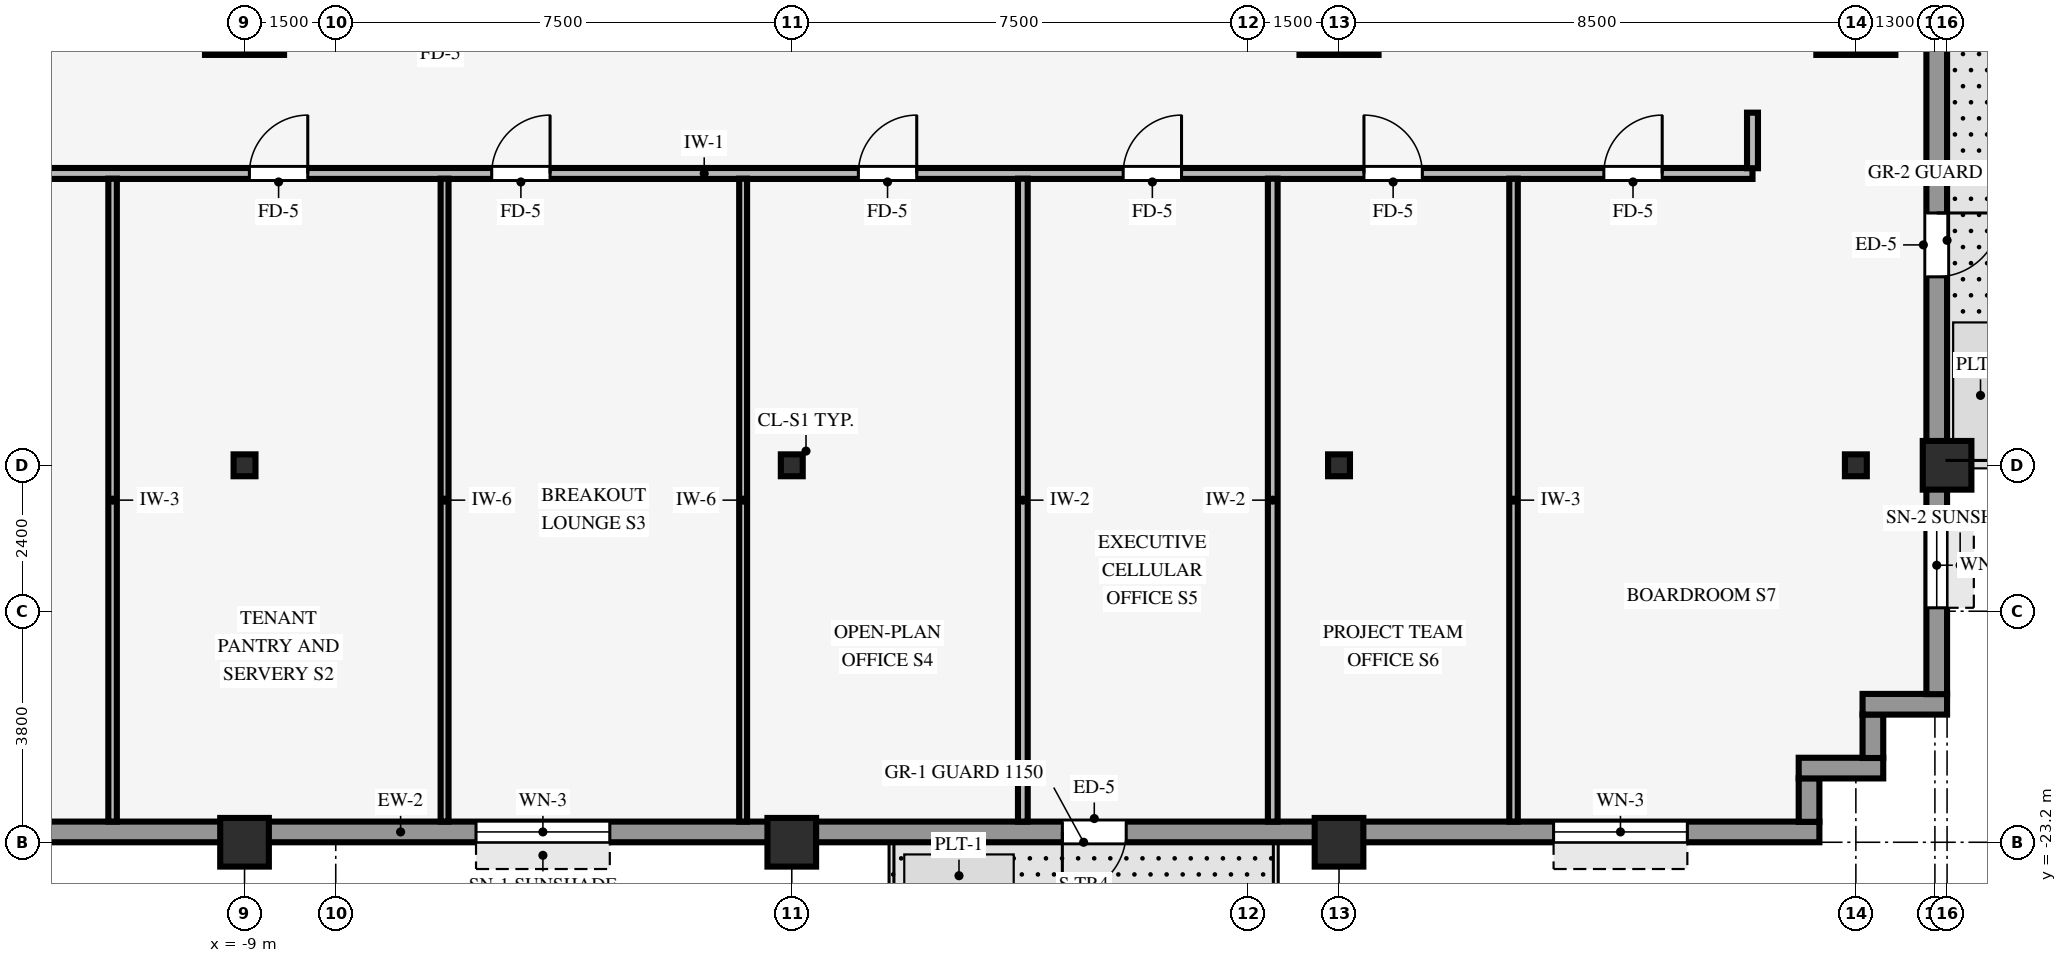
"""IFC4 building model, lengths in metres.
Left out: names, types, materials, properties, quantities, classifications, styles, units other than length and angle.
Written with IfcOpenShell. Run it as: python <this file> out.ifc"""

import sys

from ifc_helpers import new_model, si_unit, direction, frame, frame_2d, origin, origin_2d, place, context, subcontext, project, spatial, rectangle, hollow_rectangle, i_section, extrude, source, transform, mapped, element, fill, save


model = new_model("IFC4")
c1 = context("Model", 3, precision=1e-05, world=origin(), true_north=direction((0.0, 1.0)))
c2 = subcontext(c1, "Body", "Model", "MODEL_VIEW")
j1 = project(units=[si_unit("LENGTHUNIT", "METRE"), si_unit("PLANEANGLEUNIT", "RADIAN")], contexts=[c1])
p1 = place(None, origin())
s1 = spatial("IfcSite", under=j1, at=p1, CompositionType="ELEMENT")
p2 = place(p1, origin())
s2 = spatial("IfcBuilding", under=s1, at=p2, CompositionType="ELEMENT")
p3 = place(p2, frame((0.0, 0.0, 27.6)))
s3 = spatial("IfcBuildingStorey", under=s2, at=p3, CompositionType="ELEMENT", Elevation=27.6)
for number, where, z_axis, x_axis in (
    (1, (-9.0, -9.6, 0.0), (0.0, 0.0, 1.0), (1.0, 0.0, 0.0)),
    (2, (9.0, -9.6, 0.0), (0.0, 0.0, 1.0), (1.0, 0.0, 0.0)),
    (3, (17.5, -9.6, 0.0), (0.0, 0.0, 1.0), (1.0, 0.0, 0.0)),
):
    element("IfcColumn", number, at=place(p3, frame(where, z_axis=z_axis, x_axis=x_axis)), inside=s3, PredefinedType="COLUMN", context=c2, shape_type="SweptSolid", body=[
        extrude(rectangle(XDim=1.3, YDim=1.3, at=origin_2d()), origin(), (0.0, 0.0, 1.0), 3.37),
    ])
p4 = place(p3, frame((19.0, -17.0, 0.0), z_axis=(0.0, 0.0, 1.0), x_axis=(1.0, 0.0, 0.0)))
e4 = element("IfcColumn", 4, at=p4, inside=s3, PredefinedType="COLUMN", context=c2, shape_type="SweptSolid", body=[
    extrude(hollow_rectangle(XDim=0.8, YDim=0.8, WallThickness=0.055, InnerFilletRadius=0.055, OuterFilletRadius=0.11, at=origin_2d()), origin(), (0.0, 0.0, 1.0), 3.37),
])
for number, where, z_axis, x_axis in (
    (5, (-9.0, -23.2, -0.4), (0.0, 0.0, 1.0), (1.0, 0.0, 0.0)),
    (6, (0.0, -23.2, -0.4), (0.0, 0.0, 1.0), (1.0, 0.0, 0.0)),
    (7, (9.0, -23.2, -0.4), (0.0, 0.0, 1.0), (1.0, 0.0, 0.0)),
):
    element("IfcColumn", number, at=place(p3, frame(where, z_axis=z_axis, x_axis=x_axis)), inside=s3, PredefinedType="COLUMN", context=c2, shape_type="SweptSolid", body=[
        extrude(hollow_rectangle(XDim=0.8, YDim=0.8, WallThickness=0.055, InnerFilletRadius=0.055, OuterFilletRadius=0.11, at=origin_2d()), origin(), (0.0, 0.0, 1.0), 3.77),
    ])
p5 = place(p3, frame((0.0, -17.0, 0.0), z_axis=(0.0, 0.0, 1.0), x_axis=(1.0, 0.0, 0.0)))
e8 = element("IfcColumn", 8, at=p5, inside=s3, PredefinedType="COLUMN", context=c2, shape_type="SweptSolid", body=[
    extrude(i_section(OverallWidth=0.36, OverallDepth=0.36, WebThickness=0.021, FlangeThickness=0.021, FilletRadius=0.018, at=origin_2d()), origin(), (0.0, 0.0, 1.0), 3.37),
])
for number, where, z_axis, x_axis in (
    (9, (-9.0, -17.0, -0.4), (0.0, 0.0, 1.0), (1.0, 0.0, 0.0)),
    (10, (9.0, -17.0, -0.4), (0.0, 0.0, 1.0), (1.0, 0.0, 0.0)),
    (11, (17.5, -17.0, -0.4), (0.0, 0.0, 1.0), (1.0, 0.0, 0.0)),
):
    element("IfcColumn", number, at=place(p3, frame(where, z_axis=z_axis, x_axis=x_axis)), inside=s3, PredefinedType="COLUMN", context=c2, shape_type="SweptSolid", body=[
        extrude(i_section(OverallWidth=0.36, OverallDepth=0.36, WebThickness=0.021, FlangeThickness=0.021, FilletRadius=0.018, at=origin_2d()), origin(), (0.0, 0.0, 1.0), 3.77),
    ])
p6 = place(p3, frame((-16.9, -23.03, 0.0), z_axis=(0.0, 0.0, 1.0), x_axis=(1.0, 0.0, 0.0)))
e12 = element("IfcWall", 12, at=p6, inside=s3, PredefinedType="STANDARD", context=c2, shape_type="SweptSolid", body=[
    extrude(rectangle(XDim=33.8, YDim=0.34, at=frame_2d((16.9, 0.0))), origin(), (0.0, 0.0, 1.0), 2.705),
])
p7 = place(p6, frame((22.4, 0.0, 0.0), z_axis=(0.0, 0.0, 1.0), x_axis=(-1.0, 0.0, 0.0)))
e13 = element("IfcOpeningElement", 13, at=p7, cuts=e12, PredefinedType="OPENING", context=c2, shape_type="SweptSolid", body=[
    extrude(rectangle(XDim=1.05, YDim=2.1, at=frame_2d((0.525, 1.05))), frame((0.0, 0.18, 0.0), z_axis=(0.0, -1.0, 0.0), x_axis=(1.0, 0.0, 0.0)), (0.0, 0.0, 1.0), 0.36),
])
p8 = place(p6, frame((2.171, 0.0, 0.8)))
e14 = element("IfcOpeningElement", 14, at=p8, cuts=e12, PredefinedType="OPENING", context=c2, shape_type="SweptSolid", body=[
    extrude(rectangle(XDim=2.2, YDim=1.65, at=frame_2d((1.1, 0.825))), frame((0.0, 0.18, 0.0), z_axis=(0.0, -1.0, 0.0), x_axis=(1.0, 0.0, 0.0)), (0.0, 0.0, 1.0), 0.36),
])
p9 = place(p6, frame((11.707, 0.0, 0.8)))
e15 = element("IfcOpeningElement", 15, at=p9, cuts=e12, PredefinedType="OPENING", context=c2, shape_type="SweptSolid", body=[
    extrude(rectangle(XDim=2.2, YDim=1.65, at=frame_2d((1.1, 0.825))), frame((0.0, 0.18, 0.0), z_axis=(0.0, -1.0, 0.0), x_axis=(1.0, 0.0, 0.0)), (0.0, 0.0, 1.0), 0.36),
])
p10 = place(p6, frame((29.429, 0.0, 0.8)))
e16 = element("IfcOpeningElement", 16, at=p10, cuts=e12, PredefinedType="OPENING", context=c2, shape_type="SweptSolid", body=[
    extrude(rectangle(XDim=2.2, YDim=1.65, at=frame_2d((1.1, 0.825))), frame((0.0, 0.18, 0.0), z_axis=(0.0, -1.0, 0.0), x_axis=(1.0, 0.0, 0.0)), (0.0, 0.0, 1.0), 0.36),
])
p11 = place(p3, frame((16.73, -22.864, 0.0), z_axis=(0.0, 0.0, 1.0), x_axis=(0.0, 1.0, 0.0)))
e17 = element("IfcWall", 17, at=p11, inside=s3, PredefinedType="STANDARD", context=c2, shape_type="SweptSolid", body=[
    extrude(rectangle(XDim=0.718, YDim=0.34, at=frame_2d((0.359, 0.0))), origin(), (0.0, 0.0, 1.0), 3.36),
])
p12 = place(p3, frame((16.56, -21.98, 0.0), z_axis=(0.0, 0.0, 1.0), x_axis=(1.0, 0.0, 0.0)))
e18 = element("IfcWall", 18, at=p12, inside=s3, PredefinedType="STANDARD", context=c2, shape_type="SweptSolid", body=[
    extrude(rectangle(XDim=1.39, YDim=0.34, at=frame_2d((0.695, 0.0))), origin(), (0.0, 0.0, 1.0), 3.36),
])
p13 = place(p3, frame((17.78, -21.814, 0.0), z_axis=(0.0, 0.0, 1.0), x_axis=(0.0, 1.0, 0.0)))
e19 = element("IfcWall", 19, at=p13, inside=s3, PredefinedType="STANDARD", context=c2, shape_type="SweptSolid", body=[
    extrude(rectangle(XDim=0.718, YDim=0.34, at=frame_2d((0.359, 0.0))), origin(), (0.0, 0.0, 1.0), 3.36),
])
p14 = place(p3, frame((17.61, -20.93, 0.0), z_axis=(0.0, 0.0, 1.0), x_axis=(1.0, 0.0, 0.0)))
e20 = element("IfcWall", 20, at=p14, inside=s3, PredefinedType="STANDARD", context=c2, shape_type="SweptSolid", body=[
    extrude(rectangle(XDim=1.39, YDim=0.34, at=frame_2d((0.695, 0.0))), origin(), (0.0, 0.0, 1.0), 3.36),
])
p15 = place(p3, frame((18.83, -20.764, 0.0), z_axis=(0.0, 0.0, 1.0), x_axis=(0.0, 1.0, 0.0)))
e21 = element("IfcWall", 21, at=p15, inside=s3, PredefinedType="STANDARD", context=c2, shape_type="SweptSolid", body=[
    extrude(rectangle(XDim=41.528, YDim=0.34, at=frame_2d((20.764, 0.0))), origin(), (0.0, 0.0, 1.0), 2.705),
])
p16 = place(p15, frame((7.914, 0.0, 0.0), z_axis=(0.0, 0.0, 1.0), x_axis=(-1.0, 0.0, 0.0)))
e22 = element("IfcOpeningElement", 22, at=p16, cuts=e21, PredefinedType="OPENING", context=c2, shape_type="SweptSolid", body=[
    extrude(rectangle(XDim=1.05, YDim=2.1, at=frame_2d((0.525, 1.05))), frame((0.0, 0.18, 0.0), z_axis=(0.0, -1.0, 0.0), x_axis=(1.0, 0.0, 0.0)), (0.0, 0.0, 1.0), 0.36),
])
p17 = place(p15, frame((1.42, 0.0, 0.8)))
e23 = element("IfcOpeningElement", 23, at=p17, cuts=e21, PredefinedType="OPENING", context=c2, shape_type="SweptSolid", body=[
    extrude(rectangle(XDim=1.4, YDim=1.65, at=frame_2d((0.7, 0.825))), frame((0.0, 0.18, 0.0), z_axis=(0.0, -1.0, 0.0), x_axis=(1.0, 0.0, 0.0)), (0.0, 0.0, 1.0), 0.36),
])
p18 = place(p15, frame((32.417, 0.0, 0.8)))
e24 = element("IfcOpeningElement", 24, at=p18, cuts=e21, PredefinedType="OPENING", context=c2, shape_type="SweptSolid", body=[
    extrude(rectangle(XDim=1.4, YDim=1.65, at=frame_2d((0.7, 0.825))), frame((0.0, 0.18, 0.0), z_axis=(0.0, -1.0, 0.0), x_axis=(1.0, 0.0, 0.0)), (0.0, 0.0, 1.0), 0.36),
])
p19 = place(p15, frame((38.708, 0.0, 0.8)))
e25 = element("IfcOpeningElement", 25, at=p19, cuts=e21, PredefinedType="OPENING", context=c2, shape_type="SweptSolid", body=[
    extrude(rectangle(XDim=1.4, YDim=1.65, at=frame_2d((0.7, 0.825))), frame((0.0, 0.18, 0.0), z_axis=(0.0, -1.0, 0.0), x_axis=(1.0, 0.0, 0.0)), (0.0, 0.0, 1.0), 0.36),
])
p20 = place(p3, frame((-15.8, -12.2, 0.0), z_axis=(0.0, 0.0, 1.0), x_axis=(1.0, 0.0, 0.0)))
e26 = element("IfcWall", 26, at=p20, inside=s3, PredefinedType="PARTITIONING", context=c2, shape_type="SweptSolid", body=[
    extrude(rectangle(XDim=31.6, YDim=0.18, at=frame_2d((15.8, 0.0))), origin(), (0.0, 0.0, 1.0), 3.36),
])
p21 = place(p20, frame((6.88, 0.0, 0.0)))
e27 = element("IfcOpeningElement", 27, at=p21, cuts=e26, PredefinedType="OPENING", context=c2, shape_type="SweptSolid", body=[
    extrude(rectangle(XDim=0.96, YDim=2.1, at=frame_2d((0.48, 1.05))), frame((0.0, 0.1, 0.0), z_axis=(0.0, -1.0, 0.0), x_axis=(1.0, 0.0, 0.0)), (0.0, 0.0, 1.0), 0.2),
])
p22 = place(p20, frame((16.895, 0.0, 0.0)))
e28 = element("IfcOpeningElement", 28, at=p22, cuts=e26, PredefinedType="OPENING", context=c2, shape_type="SweptSolid", body=[
    extrude(rectangle(XDim=0.96, YDim=2.1, at=frame_2d((0.48, 1.05))), frame((0.0, 0.1, 0.0), z_axis=(0.0, -1.0, 0.0), x_axis=(1.0, 0.0, 0.0)), (0.0, 0.0, 1.0), 0.2),
])
p23 = place(p20, frame((1.835, 0.0, 0.0)))
e29 = element("IfcOpeningElement", 29, at=p23, cuts=e26, PredefinedType="OPENING", context=c2, shape_type="SweptSolid", body=[
    extrude(rectangle(XDim=0.96, YDim=2.1, at=frame_2d((0.48, 1.05))), frame((0.0, 0.1, 0.0), z_axis=(0.0, -1.0, 0.0), x_axis=(1.0, 0.0, 0.0)), (0.0, 0.0, 1.0), 0.2),
])
p24 = place(p20, frame((21.25, 0.0, 0.0)))
e30 = element("IfcOpeningElement", 30, at=p24, cuts=e26, PredefinedType="OPENING", context=c2, shape_type="SweptSolid", body=[
    extrude(rectangle(XDim=0.96, YDim=2.1, at=frame_2d((0.48, 1.05))), frame((0.0, 0.1, 0.0), z_axis=(0.0, -1.0, 0.0), x_axis=(1.0, 0.0, 0.0)), (0.0, 0.0, 1.0), 0.2),
])
p25 = place(p20, frame((25.21, 0.0, 0.0)))
e31 = element("IfcOpeningElement", 31, at=p25, cuts=e26, PredefinedType="OPENING", context=c2, shape_type="SweptSolid", body=[
    extrude(rectangle(XDim=0.96, YDim=2.1, at=frame_2d((0.48, 1.05))), frame((0.0, 0.1, 0.0), z_axis=(0.0, -1.0, 0.0), x_axis=(1.0, 0.0, 0.0)), (0.0, 0.0, 1.0), 0.2),
])
p26 = place(p20, frame((29.155, 0.0, 0.0)))
e32 = element("IfcOpeningElement", 32, at=p26, cuts=e26, PredefinedType="OPENING", context=c2, shape_type="SweptSolid", body=[
    extrude(rectangle(XDim=0.96, YDim=2.1, at=frame_2d((0.48, 1.05))), frame((0.0, 0.1, 0.0), z_axis=(0.0, -1.0, 0.0), x_axis=(1.0, 0.0, 0.0)), (0.0, 0.0, 1.0), 0.2),
])
p27 = place(p20, frame((10.865, 0.0, 0.0)))
e33 = element("IfcOpeningElement", 33, at=p27, cuts=e26, PredefinedType="OPENING", context=c2, shape_type="SweptSolid", body=[
    extrude(rectangle(XDim=0.96, YDim=2.1, at=frame_2d((0.48, 1.05))), frame((0.0, 0.1, 0.0), z_axis=(0.0, -1.0, 0.0), x_axis=(1.0, 0.0, 0.0)), (0.0, 0.0, 1.0), 0.2),
])
p28 = place(p3, frame((-11.17, -22.86, 0.0), z_axis=(0.0, 0.0, 1.0), x_axis=(0.0, 1.0, 0.0)))
e34 = element("IfcWall", 34, at=p28, inside=s3, PredefinedType="PARTITIONING", context=c2, shape_type="SweptSolid", body=[
    extrude(rectangle(XDim=10.574, YDim=0.14, at=frame_2d((5.287, 0.0))), origin(), (0.0, 0.0, 1.0), 3.36),
])
for number, where, z_axis, x_axis in (
    (35, (-5.71, -22.86, 0.0), (0.0, 0.0, 1.0), (0.0, 1.0, 0.0)),
    (36, (-0.8, -22.86, 0.0), (0.0, 0.0, 1.0), (0.0, 1.0, 0.0)),
):
    element("IfcWall", number, at=place(p3, frame(where, z_axis=z_axis, x_axis=x_axis)), inside=s3, PredefinedType="PARTITIONING", context=c2, shape_type="SweptSolid", body=[
        extrude(rectangle(XDim=10.574, YDim=0.13, at=frame_2d((5.287, 0.0))), origin(), (0.0, 0.0, 1.0), 3.36),
    ])
for number, where, z_axis, x_axis in (
    (37, (3.8, -22.86, 0.0), (0.0, 0.0, 1.0), (0.0, 1.0, 0.0)),
    (38, (7.91, -22.86, 0.0), (0.0, 0.0, 1.0), (0.0, 1.0, 0.0)),
):
    element("IfcWall", number, at=place(p3, frame(where, z_axis=z_axis, x_axis=x_axis)), inside=s3, PredefinedType="PARTITIONING", context=c2, shape_type="SweptSolid", body=[
        extrude(rectangle(XDim=10.574, YDim=0.16, at=frame_2d((5.287, 0.0))), origin(), (0.0, 0.0, 1.0), 3.36),
    ])
p29 = place(p3, frame((11.87, -22.86, 0.0), z_axis=(0.0, 0.0, 1.0), x_axis=(0.0, 1.0, 0.0)))
e39 = element("IfcWall", 39, at=p29, inside=s3, PredefinedType="PARTITIONING", context=c2, shape_type="SweptSolid", body=[
    extrude(rectangle(XDim=10.574, YDim=0.14, at=frame_2d((5.287, 0.0))), origin(), (0.0, 0.0, 1.0), 3.36),
])
p30 = place(p3, frame((15.8, -12.114, 0.0), z_axis=(0.0, 0.0, 1.0), x_axis=(0.0, 1.0, 0.0)))
e40 = element("IfcWall", 40, at=p30, inside=s3, PredefinedType="PARTITIONING", context=c2, shape_type="SweptSolid", body=[
    extrude(rectangle(XDim=0.914, YDim=0.18, at=frame_2d((0.457, 0.0))), origin(), (0.0, 0.0, 1.0), 3.36),
])
m1 = source(origin(), c2, "Body", "SweptSolid", [
    extrude(rectangle(XDim=1.05, YDim=2.1, at=frame_2d((0.525, 1.05))), frame((0.0, 0.025, 0.0), z_axis=(0.0, -1.0, 0.0), x_axis=(1.0, 0.0, 0.0)), (0.0, 0.0, 1.0), 0.05),
])
p31 = place(p7, origin())
e41 = element("IfcDoor", 41, at=p31, inside=s3, OperationType="SINGLE_SWING_RIGHT", PredefinedType="DOOR", context=c2, shape_type="MappedRepresentation", body=[
    mapped(m1, transform((0.0, 0.0, 0.0), scale=1.0)),
])
fill(e13, e41)
m2 = source(origin(), c2, "Body", "SweptSolid", [
    extrude(rectangle(XDim=2.2, YDim=1.65, at=frame_2d((1.1, 0.825))), frame((0.0, 0.03, 0.0), z_axis=(0.0, -1.0, 0.0), x_axis=(1.0, 0.0, 0.0)), (0.0, 0.0, 1.0), 0.06),
])
p32 = place(p9, origin())
e42 = element("IfcWindow", 42, at=p32, inside=s3, PartitioningType="SINGLE_PANEL", PredefinedType="WINDOW", context=c2, shape_type="MappedRepresentation", body=[
    mapped(m2, transform((0.0, 0.0, 0.0), scale=1.0)),
])
fill(e15, e42)
p33 = place(p10, origin())
e43 = element("IfcWindow", 43, at=p33, inside=s3, PartitioningType="SINGLE_PANEL", PredefinedType="WINDOW", context=c2, shape_type="MappedRepresentation", body=[
    mapped(m2, transform((0.0, 0.0, 0.0), scale=1.0)),
])
fill(e16, e43)
p34 = place(p16, origin())
e44 = element("IfcDoor", 44, at=p34, inside=s3, OperationType="SINGLE_SWING_LEFT", PredefinedType="DOOR", context=c2, shape_type="MappedRepresentation", body=[
    mapped(m1, transform((0.0, 0.0, 0.0), scale=1.0)),
])
fill(e22, e44)
m3 = source(origin(), c2, "Body", "SweptSolid", [
    extrude(rectangle(XDim=1.4, YDim=1.65, at=frame_2d((0.7, 0.825))), frame((0.0, 0.03, 0.0), z_axis=(0.0, -1.0, 0.0), x_axis=(1.0, 0.0, 0.0)), (0.0, 0.0, 1.0), 0.06),
])
p35 = place(p17, origin())
e45 = element("IfcWindow", 45, at=p35, inside=s3, PartitioningType="SINGLE_PANEL", PredefinedType="WINDOW", context=c2, shape_type="MappedRepresentation", body=[
    mapped(m3, transform((0.0, 0.0, 0.0), scale=1.0)),
])
fill(e23, e45)
m4 = source(origin(), c2, "Body", "SweptSolid", [
    extrude(rectangle(XDim=0.96, YDim=2.1, at=frame_2d((0.48, 1.05))), frame((0.0, 0.025, 0.0), z_axis=(0.0, -1.0, 0.0), x_axis=(1.0, 0.0, 0.0)), (0.0, 0.0, 1.0), 0.05),
])
p36 = place(p21, origin())
e46 = element("IfcDoor", 46, at=p36, inside=s3, OperationType="SINGLE_SWING_RIGHT", PredefinedType="DOOR", context=c2, shape_type="MappedRepresentation", body=[
    mapped(m4, transform((0.0, 0.0, 0.0), scale=1.0)),
])
fill(e27, e46)
p37 = place(p22, origin())
e47 = element("IfcDoor", 47, at=p37, inside=s3, OperationType="SINGLE_SWING_RIGHT", PredefinedType="DOOR", context=c2, shape_type="MappedRepresentation", body=[
    mapped(m4, transform((0.0, 0.0, 0.0), scale=1.0)),
])
fill(e28, e47)
p38 = place(p24, origin())
e48 = element("IfcDoor", 48, at=p38, inside=s3, OperationType="SINGLE_SWING_RIGHT", PredefinedType="DOOR", context=c2, shape_type="MappedRepresentation", body=[
    mapped(m4, transform((0.0, 0.0, 0.0), scale=1.0)),
])
fill(e30, e48)
p39 = place(p25, origin())
e49 = element("IfcDoor", 49, at=p39, inside=s3, OperationType="SINGLE_SWING_LEFT", PredefinedType="DOOR", context=c2, shape_type="MappedRepresentation", body=[
    mapped(m4, transform((0.0, 0.0, 0.0), scale=1.0)),
])
fill(e31, e49)
p40 = place(p26, origin())
e50 = element("IfcDoor", 50, at=p40, inside=s3, OperationType="SINGLE_SWING_RIGHT", PredefinedType="DOOR", context=c2, shape_type="MappedRepresentation", body=[
    mapped(m4, transform((0.0, 0.0, 0.0), scale=1.0)),
])
fill(e32, e50)
p41 = place(p27, origin())
e51 = element("IfcDoor", 51, at=p41, inside=s3, OperationType="SINGLE_SWING_RIGHT", PredefinedType="DOOR", context=c2, shape_type="MappedRepresentation", body=[
    mapped(m4, transform((0.0, 0.0, 0.0), scale=1.0)),
])
fill(e33, e51)
save(model, sys.argv[1])
